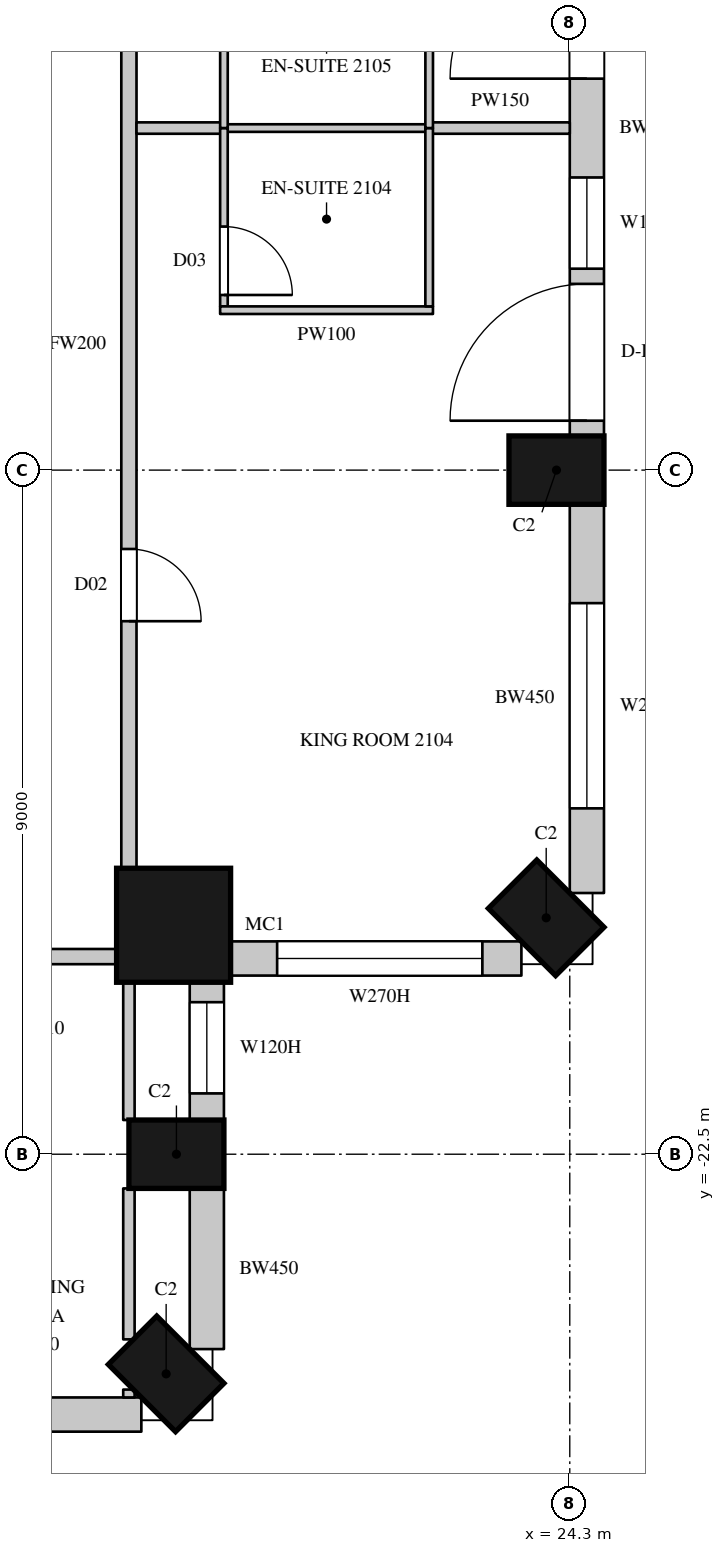
"""IFC4 building model, lengths in metres.
Left out: names, types, materials, properties, quantities, classifications, styles, units other than length and angle.
Written with IfcOpenShell. Run it as: python <this file> out.ifc"""

import sys

from ifc_helpers import new_model, si_unit, direction, frame, frame_2d, origin, origin_2d, place, context, subcontext, project, spatial, rectangle, circle, extrude, element, fill, save


model = new_model("IFC4")
c1 = context("Model", 3, precision=1e-05, world=origin(), true_north=direction((0.0, 1.0)))
c2 = subcontext(c1, "Body", "Model", "MODEL_VIEW")
j1 = project(units=[si_unit("LENGTHUNIT", "METRE"), si_unit("PLANEANGLEUNIT", "RADIAN")], contexts=[c1])
p1 = place(None, origin())
s1 = spatial("IfcSite", under=j1, at=p1, CompositionType="ELEMENT")
p2 = place(p1, origin())
s2 = spatial("IfcBuilding", under=s1, at=p2, CompositionType="ELEMENT")
p3 = place(p2, frame((0.0, 0.0, 105.9)))
s3 = spatial("IfcBuildingStorey", under=s2, at=p3, CompositionType="ELEMENT", Elevation=105.9)
for number, where, z_axis, x_axis in (
    (1, (18.99, -25.39, 0.0), (0.0, 0.0, 1.0), (0.707, 0.707, 0.0)),
    (2, (19.125, -22.5, 0.0), (0.0, 0.0, 1.0), (0.0, 1.0, 0.0)),
):
    element("IfcColumn", number, at=place(p3, frame(where, z_axis=z_axis, x_axis=x_axis)), inside=s3, PredefinedType="COLUMN", context=c2, shape_type="SweptSolid", body=[
        extrude(rectangle(XDim=0.9, YDim=1.25, at=origin_2d()), origin(), (0.0, 0.0, 1.0), 3.6),
    ])
p4 = place(p3, frame((19.088, -19.488, 0.0), z_axis=(0.0, 0.0, 1.0), x_axis=(1.0, 0.0, 0.0)))
e3 = element("IfcColumn", 3, at=p4, inside=s3, PredefinedType="COLUMN", context=c2, shape_type="SweptSolid", body=[
    extrude(circle(Radius=0.75, at=origin_2d()), origin(), (0.0, 0.0, 1.0), 3.6),
])
for number, where, z_axis, x_axis in (
    (4, (23.99, -19.39, 0.0), (0.0, 0.0, 1.0), (0.707, 0.707, 0.0)),
    (5, (24.125, -13.5, 0.0), (0.0, 0.0, 1.0), (0.0, 1.0, 0.0)),
):
    element("IfcColumn", number, at=place(p3, frame(where, z_axis=z_axis, x_axis=x_axis)), inside=s3, PredefinedType="COLUMN", context=c2, shape_type="SweptSolid", body=[
        extrude(rectangle(XDim=0.9, YDim=1.25, at=origin_2d()), origin(), (0.0, 0.0, 1.0), 3.6),
    ])
p5 = place(p3, frame((15.75, -25.925, 0.0), z_axis=(0.0, 0.0, 1.0), x_axis=(1.0, 0.0, 0.0)))
e6 = element("IfcWall", 6, at=p5, inside=s3, PredefinedType="SOLIDWALL", context=c2, shape_type="SweptSolid", body=[
    extrude(rectangle(XDim=2.914, YDim=0.45, at=frame_2d((1.457, 0.0))), origin(), (0.0, 0.0, 1.0), 3.3),
])
p6 = place(p3, frame((19.525, -25.064, 0.0), z_axis=(0.0, 0.0, 1.0), x_axis=(0.0, 1.0, 0.0)))
e7 = element("IfcWall", 7, at=p6, inside=s3, PredefinedType="SOLIDWALL", context=c2, shape_type="SweptSolid", body=[
    extrude(rectangle(XDim=2.114, YDim=0.45, at=frame_2d((1.057, 0.0))), origin(), (0.0, 0.0, 1.0), 3.3),
])
p7 = place(p3, frame((19.525, -22.05, 0.0), z_axis=(0.0, 0.0, 1.0), x_axis=(0.0, 1.0, 0.0)))
e8 = element("IfcWall", 8, at=p7, inside=s3, PredefinedType="SOLIDWALL", context=c2, shape_type="SweptSolid", body=[
    extrude(rectangle(XDim=1.843, YDim=0.45, at=frame_2d((0.921, 0.0))), origin(), (0.0, 0.0, 1.0), 3.3),
])
p8 = place(p7, frame((0.35, 0.0, 1.05)))
e9 = element("IfcOpeningElement", 9, at=p8, cuts=e8, PredefinedType="OPENING", context=c2, shape_type="SweptSolid", body=[
    extrude(rectangle(XDim=1.2, YDim=2.0, at=frame_2d((0.6, 1.0))), frame((0.0, 0.235, 0.0), z_axis=(0.0, -1.0, 0.0), x_axis=(1.0, 0.0, 0.0)), (0.0, 0.0, 1.0), 0.47),
])
p9 = place(p3, frame((19.807, -19.925, 0.0), z_axis=(0.0, 0.0, 1.0), x_axis=(1.0, 0.0, 0.0)))
e10 = element("IfcWall", 10, at=p9, inside=s3, PredefinedType="SOLIDWALL", context=c2, shape_type="SweptSolid", body=[
    extrude(rectangle(XDim=3.857, YDim=0.45, at=frame_2d((1.928, 0.0))), origin(), (0.0, 0.0, 1.0), 3.3),
])
p10 = place(p9, frame((0.643, 0.0, 1.05)))
e11 = element("IfcOpeningElement", 11, at=p10, cuts=e10, PredefinedType="OPENING", context=c2, shape_type="SweptSolid", body=[
    extrude(rectangle(XDim=2.7, YDim=2.0, at=frame_2d((1.35, 1.0))), frame((0.0, 0.235, 0.0), z_axis=(0.0, -1.0, 0.0), x_axis=(1.0, 0.0, 0.0)), (0.0, 0.0, 1.0), 0.47),
])
p11 = place(p3, frame((24.525, -19.064, 0.0), z_axis=(0.0, 0.0, 1.0), x_axis=(0.0, 1.0, 0.0)))
e12 = element("IfcWall", 12, at=p11, inside=s3, PredefinedType="SOLIDWALL", context=c2, shape_type="SweptSolid", body=[
    extrude(rectangle(XDim=5.114, YDim=0.45, at=frame_2d((2.557, 0.0))), origin(), (0.0, 0.0, 1.0), 3.3),
])
p12 = place(p11, frame((1.114, 0.0, 1.05)))
e13 = element("IfcOpeningElement", 13, at=p12, cuts=e12, PredefinedType="OPENING", context=c2, shape_type="SweptSolid", body=[
    extrude(rectangle(XDim=2.7, YDim=2.0, at=frame_2d((1.35, 1.0))), frame((0.0, 0.235, 0.0), z_axis=(0.0, -1.0, 0.0), x_axis=(1.0, 0.0, 0.0)), (0.0, 0.0, 1.0), 0.47),
])
p13 = place(p3, frame((24.525, -13.05, 0.0), z_axis=(0.0, 0.0, 1.0), x_axis=(0.0, 1.0, 0.0)))
e14 = element("IfcWall", 14, at=p13, inside=s3, PredefinedType="SOLIDWALL", context=c2, shape_type="SweptSolid", body=[
    extrude(rectangle(XDim=8.1, YDim=0.45, at=frame_2d((4.05, 0.0))), origin(), (0.0, 0.0, 1.0), 3.3),
])
p14 = place(p13, frame((0.2, 0.0, 0.0)))
e15 = element("IfcOpeningElement", 15, at=p14, cuts=e14, PredefinedType="OPENING", context=c2, shape_type="SweptSolid", body=[
    extrude(rectangle(XDim=1.8, YDim=2.4, at=frame_2d((0.9, 1.2))), frame((0.0, 0.235, 0.0), z_axis=(0.0, -1.0, 0.0), x_axis=(1.0, 0.0, 0.0)), (0.0, 0.0, 1.0), 0.47),
])
p15 = place(p13, frame((2.2, 0.0, 1.05)))
e16 = element("IfcOpeningElement", 16, at=p15, cuts=e14, PredefinedType="OPENING", context=c2, shape_type="SweptSolid", body=[
    extrude(rectangle(XDim=1.2, YDim=2.0, at=frame_2d((0.6, 1.0))), frame((0.0, 0.235, 0.0), z_axis=(0.0, -1.0, 0.0), x_axis=(1.0, 0.0, 0.0)), (0.0, 0.0, 1.0), 0.47),
])
p16 = place(p13, frame((4.7, 0.0, 0.0)))
e17 = element("IfcOpeningElement", 17, at=p16, cuts=e14, PredefinedType="OPENING", context=c2, shape_type="SweptSolid", body=[
    extrude(rectangle(XDim=1.8, YDim=2.4, at=frame_2d((0.9, 1.2))), frame((0.0, 0.235, 0.0), z_axis=(0.0, -1.0, 0.0), x_axis=(1.0, 0.0, 0.0)), (0.0, 0.0, 1.0), 0.47),
])
p17 = place(p13, frame((6.7, 0.0, 1.05)))
e18 = element("IfcOpeningElement", 18, at=p17, cuts=e14, PredefinedType="OPENING", context=c2, shape_type="SweptSolid", body=[
    extrude(rectangle(XDim=1.2, YDim=2.0, at=frame_2d((0.6, 1.0))), frame((0.0, 0.235, 0.0), z_axis=(0.0, -1.0, 0.0), x_axis=(1.0, 0.0, 0.0)), (0.0, 0.0, 1.0), 0.47),
])
p18 = place(p3, frame((-23.822, -19.9, 0.0), z_axis=(0.0, 0.0, 1.0), x_axis=(1.0, 0.0, 0.0)))
e19 = element("IfcWall", 19, at=p18, inside=s3, PredefinedType="PARTITIONING", context=c2, shape_type="SweptSolid", body=[
    extrude(rectangle(XDim=42.222, YDim=0.2, at=frame_2d((21.111, 0.0))), origin(), (0.0, 0.0, 1.0), 3.3),
])
p19 = place(p18, frame((6.25, 0.0, 0.0)))
e20 = element("IfcOpeningElement", 20, at=p19, cuts=e19, PredefinedType="OPENING", context=c2, shape_type="SweptSolid", body=[
    extrude(rectangle(XDim=0.95, YDim=2.2, at=frame_2d((0.475, 1.1))), frame((0.0, 0.11, 0.0), z_axis=(0.0, -1.0, 0.0), x_axis=(1.0, 0.0, 0.0)), (0.0, 0.0, 1.0), 0.22),
])
p20 = place(p18, frame((14.15, 0.0, 0.0)))
e21 = element("IfcOpeningElement", 21, at=p20, cuts=e19, PredefinedType="OPENING", context=c2, shape_type="SweptSolid", body=[
    extrude(rectangle(XDim=1.1, YDim=2.4, at=frame_2d((0.55, 1.2))), frame((0.0, 0.11, 0.0), z_axis=(0.0, -1.0, 0.0), x_axis=(1.0, 0.0, 0.0)), (0.0, 0.0, 1.0), 0.22),
])
p21 = place(p18, frame((24.25, 0.0, 0.0)))
e22 = element("IfcOpeningElement", 22, at=p21, cuts=e19, PredefinedType="OPENING", context=c2, shape_type="SweptSolid", body=[
    extrude(rectangle(XDim=0.95, YDim=2.2, at=frame_2d((0.475, 1.1))), frame((0.0, 0.11, 0.0), z_axis=(0.0, -1.0, 0.0), x_axis=(1.0, 0.0, 0.0)), (0.0, 0.0, 1.0), 0.22),
])
p22 = place(p18, frame((32.95, 0.0, 0.0)))
e23 = element("IfcOpeningElement", 23, at=p22, cuts=e19, PredefinedType="OPENING", context=c2, shape_type="SweptSolid", body=[
    extrude(rectangle(XDim=1.1, YDim=2.4, at=frame_2d((0.55, 1.2))), frame((0.0, 0.11, 0.0), z_axis=(0.0, -1.0, 0.0), x_axis=(1.0, 0.0, 0.0)), (0.0, 0.0, 1.0), 0.22),
])
p23 = place(p3, frame((18.5, -18.938, 0.0), z_axis=(0.0, 0.0, 1.0), x_axis=(0.0, 1.0, 0.0)))
e24 = element("IfcWall", 24, at=p23, inside=s3, PredefinedType="PARTITIONING", context=c2, shape_type="SweptSolid", body=[
    extrude(rectangle(XDim=14.188, YDim=0.2, at=frame_2d((7.094, 0.0))), origin(), (0.0, 0.0, 1.0), 3.3),
])
p24 = place(p23, frame((3.45, 0.0, 0.0)))
e25 = element("IfcOpeningElement", 25, at=p24, cuts=e24, PredefinedType="OPENING", context=c2, shape_type="SweptSolid", body=[
    extrude(rectangle(XDim=0.95, YDim=2.2, at=frame_2d((0.475, 1.1))), frame((0.0, 0.11, 0.0), z_axis=(0.0, -1.0, 0.0), x_axis=(1.0, 0.0, 0.0)), (0.0, 0.0, 1.0), 0.22),
])
p25 = place(p23, frame((12.85, 0.0, 0.0)))
e26 = element("IfcOpeningElement", 26, at=p25, cuts=e24, PredefinedType="OPENING", context=c2, shape_type="SweptSolid", body=[
    extrude(rectangle(XDim=0.95, YDim=2.2, at=frame_2d((0.475, 1.1))), frame((0.0, 0.11, 0.0), z_axis=(0.0, -1.0, 0.0), x_axis=(1.0, 0.0, 0.0)), (0.0, 0.0, 1.0), 0.22),
])
p26 = place(p3, frame((18.5, -25.7, 0.0), z_axis=(0.0, 0.0, 1.0), x_axis=(0.0, 1.0, 0.0)))
e27 = element("IfcWall", 27, at=p26, inside=s3, PredefinedType="PARTITIONING", context=c2, shape_type="SweptSolid", body=[
    extrude(rectangle(XDim=0.104, YDim=0.15, at=frame_2d((0.052, 0.0))), origin(), (0.0, 0.0, 1.0), 3.3),
])
p27 = place(p3, frame((18.5, -24.936, 0.0), z_axis=(0.0, 0.0, 1.0), x_axis=(0.0, 1.0, 0.0)))
e28 = element("IfcWall", 28, at=p27, inside=s3, PredefinedType="PARTITIONING", context=c2, shape_type="SweptSolid", body=[
    extrude(rectangle(XDim=1.986, YDim=0.15, at=frame_2d((0.993, 0.0))), origin(), (0.0, 0.0, 1.0), 3.3),
])
p28 = place(p3, frame((18.5, -22.05, 0.0), z_axis=(0.0, 0.0, 1.0), x_axis=(0.0, 1.0, 0.0)))
e29 = element("IfcWall", 29, at=p28, inside=s3, PredefinedType="PARTITIONING", context=c2, shape_type="SweptSolid", body=[
    extrude(rectangle(XDim=2.032, YDim=0.15, at=frame_2d((1.016, 0.0))), origin(), (0.0, 0.0, 1.0), 3.3),
])
p29 = place(p3, frame((18.6, -9.0, 0.0), z_axis=(0.0, 0.0, 1.0), x_axis=(1.0, 0.0, 0.0)))
e30 = element("IfcWall", 30, at=p29, inside=s3, PredefinedType="PARTITIONING", context=c2, shape_type="SweptSolid", body=[
    extrude(rectangle(XDim=1.13, YDim=0.15, at=frame_2d((0.565, 0.0))), origin(), (0.0, 0.0, 1.0), 2.65),
])
p30 = place(p3, frame((22.47, -9.0, 0.0), z_axis=(0.0, 0.0, 1.0), x_axis=(1.0, 0.0, 0.0)))
e31 = element("IfcWall", 31, at=p30, inside=s3, PredefinedType="PARTITIONING", context=c2, shape_type="SweptSolid", body=[
    extrude(rectangle(XDim=1.83, YDim=0.15, at=frame_2d((0.915, 0.0))), origin(), (0.0, 0.0, 1.0), 2.65),
])
p31 = place(p3, frame((19.73, -9.0, 0.0), z_axis=(0.0, 0.0, 1.0), x_axis=(1.0, 0.0, 0.0)))
e32 = element("IfcWall", 32, at=p31, inside=s3, PredefinedType="PARTITIONING", context=c2, shape_type="SweptSolid", body=[
    extrude(rectangle(XDim=2.74, YDim=0.1, at=frame_2d((1.37, 0.0))), origin(), (0.0, 0.0, 1.0), 2.65),
])
p32 = place(p3, frame((19.75, -11.346, 0.0), z_axis=(0.0, 0.0, 1.0), x_axis=(0.0, 1.0, 0.0)))
e33 = element("IfcWall", 33, at=p32, inside=s3, PredefinedType="PARTITIONING", context=c2, shape_type="SweptSolid", body=[
    extrude(rectangle(XDim=2.346, YDim=0.1, at=frame_2d((1.173, 0.0))), origin(), (0.0, 0.0, 1.0), 3.3),
])
p33 = place(p32, frame((0.15, 0.0, 0.0)))
e34 = element("IfcOpeningElement", 34, at=p33, cuts=e33, PredefinedType="OPENING", context=c2, shape_type="SweptSolid", body=[
    extrude(rectangle(XDim=0.9, YDim=2.2, at=frame_2d((0.45, 1.1))), frame((0.0, 0.06, 0.0), z_axis=(0.0, -1.0, 0.0), x_axis=(1.0, 0.0, 0.0)), (0.0, 0.0, 1.0), 0.12),
])
p34 = place(p3, frame((19.7, -11.396, 0.0), z_axis=(0.0, 0.0, 1.0), x_axis=(1.0, 0.0, 0.0)))
e35 = element("IfcWall", 35, at=p34, inside=s3, PredefinedType="PARTITIONING", context=c2, shape_type="SweptSolid", body=[
    extrude(rectangle(XDim=2.8, YDim=0.1, at=frame_2d((1.4, 0.0))), origin(), (0.0, 0.0, 1.0), 3.3),
])
p35 = place(p3, frame((19.75, -9.0, 0.0), z_axis=(0.0, 0.0, 1.0), x_axis=(0.000399241409, 0.999999920303, 0.0)))
e36 = element("IfcWall", 36, at=p35, inside=s3, PredefinedType="PARTITIONING", context=c2, shape_type="SweptSolid", body=[
    extrude(rectangle(XDim=2.446, YDim=0.1, at=frame_2d((1.223, 0.0))), origin(), (0.0, 0.0, 1.0), 3.3),
])
p36 = place(p35, frame((1.3, 0.0, 0.0)))
e37 = element("IfcOpeningElement", 37, at=p36, cuts=e36, PredefinedType="OPENING", context=c2, shape_type="SweptSolid", body=[
    extrude(rectangle(XDim=0.9, YDim=2.2, at=frame_2d((0.45, 1.1))), frame((0.0, 0.06, 0.0), z_axis=(0.0, -1.0, 0.0), x_axis=(1.0, 0.0, 0.0)), (0.0, 0.0, 1.0), 0.12),
])
p37 = place(p3, frame((22.45, -11.346, 0.0), z_axis=(0.0, 0.0, 1.0), x_axis=(0.0, 1.0, 0.0)))
e38 = element("IfcWall", 38, at=p37, inside=s3, PredefinedType="PARTITIONING", context=c2, shape_type="SweptSolid", body=[
    extrude(rectangle(XDim=2.346, YDim=0.1, at=frame_2d((1.173, 0.0))), origin(), (0.0, 0.0, 1.0), 3.3),
])
p38 = place(p3, frame((22.45, -9.0, 0.0), z_axis=(0.0, 0.0, 1.0), x_axis=(0.00041644973, 0.999999913285, 0.0)))
e39 = element("IfcWall", 39, at=p38, inside=s3, PredefinedType="PARTITIONING", context=c2, shape_type="SweptSolid", body=[
    extrude(rectangle(XDim=2.345, YDim=0.1, at=frame_2d((1.172, 0.0))), origin(), (0.0, 0.0, 1.0), 3.3),
])
p39 = place(p8, origin())
e40 = element("IfcWindow", 40, at=p39, inside=s3, PartitioningType="SINGLE_PANEL", PredefinedType="WINDOW", context=c2, shape_type="SweptSolid", body=[
    extrude(rectangle(XDim=1.2, YDim=2.0, at=frame_2d((0.6, 1.0))), frame((0.0, 0.135, 0.0), z_axis=(0.0, -1.0, 0.0), x_axis=(1.0, 0.0, 0.0)), (0.0, 0.0, 1.0), 0.06),
])
fill(e9, e40)
p40 = place(p10, origin())
e41 = element("IfcWindow", 41, at=p40, inside=s3, PartitioningType="SINGLE_PANEL", PredefinedType="WINDOW", context=c2, shape_type="SweptSolid", body=[
    extrude(rectangle(XDim=2.7, YDim=2.0, at=frame_2d((1.35, 1.0))), frame((0.0, 0.135, 0.0), z_axis=(0.0, -1.0, 0.0), x_axis=(1.0, 0.0, 0.0)), (0.0, 0.0, 1.0), 0.06),
])
fill(e11, e41)
p41 = place(p12, origin())
e42 = element("IfcWindow", 42, at=p41, inside=s3, PartitioningType="SINGLE_PANEL", PredefinedType="WINDOW", context=c2, shape_type="SweptSolid", body=[
    extrude(rectangle(XDim=2.7, YDim=2.0, at=frame_2d((1.35, 1.0))), frame((0.0, 0.135, 0.0), z_axis=(0.0, -1.0, 0.0), x_axis=(1.0, 0.0, 0.0)), (0.0, 0.0, 1.0), 0.06),
])
fill(e13, e42)
p42 = place(p14, origin())
e43 = element("IfcDoor", 43, at=p42, inside=s3, OperationType="SLIDING_TO_LEFT", PredefinedType="DOOR", context=c2, shape_type="SweptSolid", body=[
    extrude(rectangle(XDim=1.8, YDim=2.4, at=frame_2d((0.9, 1.2))), frame((0.0, 0.13, 0.0), z_axis=(0.0, -1.0, 0.0), x_axis=(1.0, 0.0, 0.0)), (0.0, 0.0, 1.0), 0.05),
])
fill(e15, e43)
p43 = place(p15, origin())
e44 = element("IfcWindow", 44, at=p43, inside=s3, PartitioningType="SINGLE_PANEL", PredefinedType="WINDOW", context=c2, shape_type="SweptSolid", body=[
    extrude(rectangle(XDim=1.2, YDim=2.0, at=frame_2d((0.6, 1.0))), frame((0.0, 0.135, 0.0), z_axis=(0.0, -1.0, 0.0), x_axis=(1.0, 0.0, 0.0)), (0.0, 0.0, 1.0), 0.06),
])
fill(e16, e44)
p44 = place(p16, origin())
e45 = element("IfcDoor", 45, at=p44, inside=s3, OperationType="SLIDING_TO_LEFT", PredefinedType="DOOR", context=c2, shape_type="SweptSolid", body=[
    extrude(rectangle(XDim=1.8, YDim=2.4, at=frame_2d((0.9, 1.2))), frame((0.0, 0.13, 0.0), z_axis=(0.0, -1.0, 0.0), x_axis=(1.0, 0.0, 0.0)), (0.0, 0.0, 1.0), 0.05),
])
fill(e17, e45)
p45 = place(p24, origin())
e46 = element("IfcDoor", 46, at=p45, inside=s3, OperationType="SINGLE_SWING_RIGHT", PredefinedType="DOOR", context=c2, shape_type="SweptSolid", body=[
    extrude(rectangle(XDim=0.95, YDim=2.2, at=frame_2d((0.475, 1.1))), frame((0.0, 0.025, 0.0), z_axis=(0.0, -1.0, 0.0), x_axis=(1.0, 0.0, 0.0)), (0.0, 0.0, 1.0), 0.05),
])
fill(e25, e46)
p46 = place(p33, origin())
e47 = element("IfcDoor", 47, at=p46, inside=s3, OperationType="SINGLE_SWING_RIGHT", PredefinedType="DOOR", context=c2, shape_type="SweptSolid", body=[
    extrude(rectangle(XDim=0.9, YDim=2.2, at=frame_2d((0.45, 1.1))), frame((0.0, 0.025, 0.0), z_axis=(0.0, -1.0, 0.0), x_axis=(1.0, 0.0, 0.0)), (0.0, 0.0, 1.0), 0.05),
])
fill(e34, e47)
save(model, sys.argv[1])
